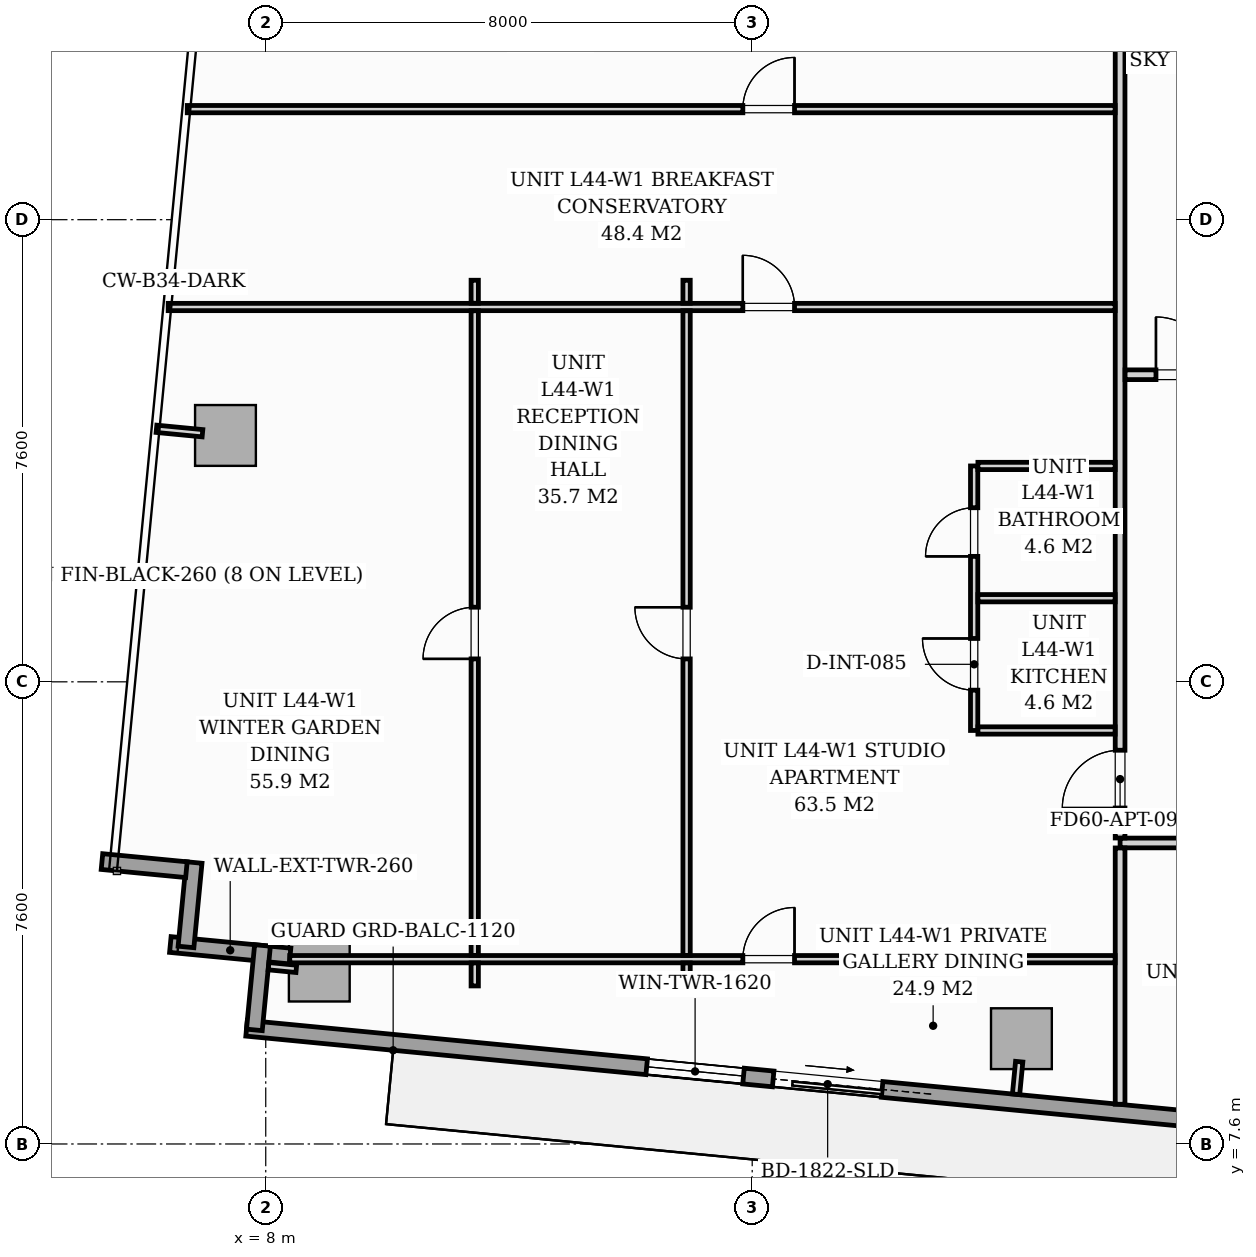
"""IFC4 building model, lengths in metres.
Left out: names, types, materials, properties, quantities, classifications, styles, units other than length and angle.
Written with IfcOpenShell. Run it as: python <this file> out.ifc"""

import sys

from ifc_helpers import new_model, si_unit, direction, frame, frame_2d, origin, origin_2d, place, context, subcontext, project, spatial, rectangle, extrude, source, transform, mapped, element, fill, save


model = new_model("IFC4")
c1 = context("Model", 3, precision=1e-05, world=origin(), true_north=direction((0.0, 1.0)))
c2 = subcontext(c1, "Body", "Model", "MODEL_VIEW")
j1 = project(units=[si_unit("LENGTHUNIT", "METRE"), si_unit("PLANEANGLEUNIT", "RADIAN")], contexts=[c1])
p1 = place(None, origin())
s1 = spatial("IfcSite", under=j1, at=p1, CompositionType="ELEMENT")
p2 = place(p1, origin())
s2 = spatial("IfcBuilding", under=s1, at=p2, CompositionType="ELEMENT")
p3 = place(p2, frame((0.0, 0.0, 153.4)))
s3 = spatial("IfcBuildingStorey", under=s2, at=p3, CompositionType="ELEMENT", Elevation=153.4)
m1 = source(origin(), c2, "Body", "SweptSolid", [
    extrude(rectangle(XDim=1.0, YDim=1.0, at=origin_2d()), origin(), (0.0, 0.0, 1.0), 3.196),
])
for number, where, z_axis, x_axis in (
    (1, (8.881, 10.443, 0.002), (0.0, 0.0, 1.0), (0.995, -0.096, 0.0)),
    (2, (20.427, 9.332, 0.002), (0.0, 0.0, 1.0), (0.995, -0.096, 0.0)),
    (3, (7.338, 19.252, 0.002), (0.0, 0.0, 1.0), (0.995, -0.096, 0.0)),
):
    element("IfcColumn", number, at=place(p3, frame(where, z_axis=z_axis, x_axis=x_axis)), inside=s3, PredefinedType="COLUMN", context=c2, shape_type="MappedRepresentation", body=[
        mapped(m1, transform((0.0, 0.0, 0.0), scale=1.0)),
    ])
p4 = place(p3, frame((8.4, 10.69, 0.0), z_axis=(0.0, 0.0, 1.0), x_axis=(-0.995391147587, 0.095898192396, 0.0)))
e4 = element("IfcWall", 4, at=p4, inside=s3, PredefinedType="STANDARD", context=c2, shape_type="SweptSolid", body=[
    extrude(rectangle(XDim=1.978, YDim=0.26, at=frame_2d((0.989, 0.0))), origin(), (0.0, 0.0, 1.0), 2.94),
])
p5 = place(p3, frame((6.688, 10.84, 0.0), z_axis=(0.0, 0.0, 1.0), x_axis=(0.09589913835, 0.995391056452, 0.0)))
e5 = element("IfcWall", 5, at=p5, inside=s3, PredefinedType="STANDARD", context=c2, shape_type="SweptSolid", body=[
    extrude(rectangle(XDim=1.395, YDim=0.26, at=frame_2d((0.698, 0.0))), origin(), (0.0, 0.0, 1.0), 2.94),
])
p6 = place(p3, frame((6.695, 12.111, 0.0), z_axis=(0.0, 0.0, 1.0), x_axis=(-0.99540614245, 0.095742423056, 0.0)))
e6 = element("IfcWall", 6, at=p6, inside=s3, PredefinedType="STANDARD", context=c2, shape_type="SweptSolid", body=[
    extrude(rectangle(XDim=1.395, YDim=0.26, at=frame_2d((0.697, 0.0))), origin(), (0.0, 0.0, 1.0), 2.94),
])
p7 = place(p3, frame((24.617, 7.873, 0.0), z_axis=(0.0, 0.0, 1.0), x_axis=(-0.995395976631, 0.095848055311, 0.0)))
e7 = element("IfcWall", 7, at=p7, inside=s3, PredefinedType="STANDARD", context=c2, shape_type="SweptSolid", body=[
    extrude(rectangle(XDim=17.01, YDim=0.26, at=frame_2d((8.505, 0.0))), origin(), (0.0, 0.0, 1.0), 2.94),
])
p8 = place(p7, frame((6.51, 0.0, 0.0)))
e8 = element("IfcOpeningElement", 8, at=p8, cuts=e7, PredefinedType="OPENING", context=c2, shape_type="SweptSolid", body=[
    extrude(rectangle(XDim=1.8, YDim=2.06, at=frame_2d((0.9, 1.03))), frame((0.0, 0.14, 0.0), z_axis=(0.0, -1.0, 0.0), x_axis=(1.0, 0.0, 0.0)), (0.0, 0.0, 1.0), 0.28),
])
p9 = place(p7, frame((8.8, 0.0, 0.65)))
e9 = element("IfcOpeningElement", 9, at=p9, cuts=e7, PredefinedType="OPENING", context=c2, shape_type="SweptSolid", body=[
    extrude(rectangle(XDim=1.6, YDim=1.5, at=frame_2d((0.8, 0.75))), frame((0.0, 0.14, 0.0), z_axis=(0.0, -1.0, 0.0), x_axis=(1.0, 0.0, 0.0)), (0.0, 0.0, 1.0), 0.28),
])
p10 = place(p3, frame((7.813, 9.476, 0.0), z_axis=(0.0, 0.0, 1.0), x_axis=(0.095915846097, 0.995389446633, 0.0)))
e10 = element("IfcWall", 10, at=p10, inside=s3, PredefinedType="STANDARD", context=c2, shape_type="SweptSolid", body=[
    extrude(rectangle(XDim=1.395, YDim=0.26, at=frame_2d((0.697, 0.0))), origin(), (0.0, 0.0, 1.0), 2.94),
])
p11 = place(p3, frame((22.05, 12.55, 0.0), z_axis=(0.0, 0.0, 1.0), x_axis=(1.0, 0.0, 0.0)))
e11 = element("IfcWall", 11, at=p11, inside=s3, PredefinedType="PARTITIONING", context=c2, shape_type="SweptSolid", body=[
    extrude(rectangle(XDim=23.83, YDim=0.16, at=frame_2d((11.915, 0.0))), origin(), (0.0, 0.0, 1.0), 2.94),
])
p12 = place(p11, frame((1.873, 0.0, 0.0)))
e12 = element("IfcOpeningElement", 12, at=p12, cuts=e11, PredefinedType="OPENING", context=c2, shape_type="SweptSolid", body=[
    extrude(rectangle(XDim=0.95, YDim=2.06, at=frame_2d((0.475, 1.03))), frame((0.0, 0.09, 0.0), z_axis=(0.0, -1.0, 0.0), x_axis=(1.0, 0.0, 0.0)), (0.0, 0.0, 1.0), 0.18),
])
p13 = place(p11, frame((10.224, 0.0, 0.0)))
e13 = element("IfcOpeningElement", 13, at=p13, cuts=e11, PredefinedType="OPENING", context=c2, shape_type="SweptSolid", body=[
    extrude(rectangle(XDim=0.95, YDim=2.06, at=frame_2d((0.475, 1.03))), frame((0.0, 0.09, 0.0), z_axis=(0.0, -1.0, 0.0), x_axis=(1.0, 0.0, 0.0)), (0.0, 0.0, 1.0), 0.18),
])
p14 = place(p11, frame((21.84, 0.0, 0.0)))
e14 = element("IfcOpeningElement", 14, at=p14, cuts=e11, PredefinedType="OPENING", context=c2, shape_type="SweptSolid", body=[
    extrude(rectangle(XDim=0.95, YDim=2.06, at=frame_2d((0.475, 1.03))), frame((0.0, 0.09, 0.0), z_axis=(0.0, -1.0, 0.0), x_axis=(1.0, 0.0, 0.0)), (0.0, 0.0, 1.0), 0.18),
])
p15 = place(p3, frame((22.05, 8.253, 0.0), z_axis=(0.0, 0.0, 1.0), x_axis=(0.0, 1.0, 0.0)))
e15 = element("IfcWall", 15, at=p15, inside=s3, PredefinedType="PARTITIONING", context=c2, shape_type="SweptSolid", body=[
    extrude(rectangle(XDim=4.215, YDim=0.16, at=frame_2d((2.107, 0.0))), origin(), (0.0, 0.0, 1.0), 2.94),
])
p16 = place(p3, frame((22.05, 12.632, 0.0), z_axis=(0.0, 0.0, 1.0), x_axis=(0.0, 1.0, 0.0)))
e16 = element("IfcWall", 16, at=p16, inside=s3, PredefinedType="PARTITIONING", context=c2, shape_type="SweptSolid", body=[
    extrude(rectangle(XDim=14.785, YDim=0.16, at=frame_2d((7.393, 0.0))), origin(), (0.0, 0.0, 1.0), 2.94),
])
p17 = place(p16, frame((0.493, 0.0, 0.0)))
e17 = element("IfcOpeningElement", 17, at=p17, cuts=e16, PredefinedType="OPENING", context=c2, shape_type="SweptSolid", body=[
    extrude(rectangle(XDim=0.95, YDim=2.06, at=frame_2d((0.475, 1.03))), frame((0.0, 0.09, 0.0), z_axis=(0.0, -1.0, 0.0), x_axis=(1.0, 0.0, 0.0)), (0.0, 0.0, 1.0), 0.18),
])
p18 = place(p3, frame((19.65, 14.4, 0.0), z_axis=(0.0, 0.0, 1.0), x_axis=(0.0, 1.0, 0.0)))
e18 = element("IfcWall", 18, at=p18, inside=s3, PredefinedType="PARTITIONING", context=c2, shape_type="SweptSolid", body=[
    extrude(rectangle(XDim=4.35, YDim=0.12, at=frame_2d((2.175, 0.0))), origin(), (0.0, 0.0, 1.0), 2.94),
])
p19 = place(p18, frame((0.663, 0.0, 0.0)))
e19 = element("IfcOpeningElement", 19, at=p19, cuts=e18, PredefinedType="OPENING", context=c2, shape_type="SweptSolid", body=[
    extrude(rectangle(XDim=0.85, YDim=2.05, at=frame_2d((0.425, 1.025))), frame((0.0, 0.07, 0.0), z_axis=(0.0, -1.0, 0.0), x_axis=(1.0, 0.0, 0.0)), (0.0, 0.0, 1.0), 0.14),
])
p20 = place(p18, frame((2.863, 0.0, 0.0)))
e20 = element("IfcOpeningElement", 20, at=p20, cuts=e18, PredefinedType="OPENING", context=c2, shape_type="SweptSolid", body=[
    extrude(rectangle(XDim=0.8, YDim=2.02, at=frame_2d((0.4, 1.01))), frame((0.0, 0.07, 0.0), z_axis=(0.0, -1.0, 0.0), x_axis=(1.0, 0.0, 0.0)), (0.0, 0.0, 1.0), 0.14),
])
for number, where, z_axis, x_axis in (
    (21, (19.712, 16.575, 0.0), (0.0, 0.0, 1.0), (1.0, 0.0, 0.0)),
    (22, (19.712, 14.4, 0.0), (0.0, 0.0, 1.0), (1.0, 0.0, 0.0)),
    (23, (19.712, 18.75, 0.0), (0.0, 0.0, 1.0), (1.0, 0.0, 0.0)),
):
    element("IfcWall", number, at=place(p3, frame(where, z_axis=z_axis, x_axis=x_axis)), inside=s3, PredefinedType="PARTITIONING", context=c2, shape_type="SweptSolid", body=[
        extrude(rectangle(XDim=2.256, YDim=0.12, at=frame_2d((1.128, 0.0))), origin(), (0.0, 0.0, 1.0), 2.94),
    ])
p21 = place(p3, frame((6.709, 24.618, 0.0), z_axis=(0.0, 0.0, 1.0), x_axis=(1.0, 0.0, 0.0)))
e24 = element("IfcWall", 24, at=p21, inside=s3, PredefinedType="PARTITIONING", context=c2, shape_type="SweptSolid", body=[
    extrude(rectangle(XDim=15.259, YDim=0.12, at=frame_2d((7.629, 0.0))), origin(), (0.0, 0.0, 1.0), 2.94),
])
p22 = place(p21, frame((9.137, 0.0, 0.0)))
e25 = element("IfcOpeningElement", 25, at=p22, cuts=e24, PredefinedType="OPENING", context=c2, shape_type="SweptSolid", body=[
    extrude(rectangle(XDim=0.85, YDim=2.05, at=frame_2d((0.425, 1.025))), frame((0.0, 0.07, 0.0), z_axis=(0.0, -1.0, 0.0), x_axis=(1.0, 0.0, 0.0)), (0.0, 0.0, 1.0), 0.14),
])
p23 = place(p3, frame((6.396, 21.364, 0.0), z_axis=(0.0, 0.0, 1.0), x_axis=(1.0, 0.0, 0.0)))
e26 = element("IfcWall", 26, at=p23, inside=s3, PredefinedType="PARTITIONING", context=c2, shape_type="SweptSolid", body=[
    extrude(rectangle(XDim=15.572, YDim=0.12, at=frame_2d((7.786, 0.0))), origin(), (0.0, 0.0, 1.0), 2.94),
])
p24 = place(p23, frame((9.45, 0.0, 0.0)))
e27 = element("IfcOpeningElement", 27, at=p24, cuts=e26, PredefinedType="OPENING", context=c2, shape_type="SweptSolid", body=[
    extrude(rectangle(XDim=0.85, YDim=2.05, at=frame_2d((0.425, 1.025))), frame((0.0, 0.07, 0.0), z_axis=(0.0, -1.0, 0.0), x_axis=(1.0, 0.0, 0.0)), (0.0, 0.0, 1.0), 0.14),
])
p25 = place(p3, frame((8.395, 10.639, 0.0), z_axis=(0.0, 0.0, 1.0), x_axis=(1.0, 0.0, 0.0)))
e28 = element("IfcWall", 28, at=p25, inside=s3, PredefinedType="PARTITIONING", context=c2, shape_type="SweptSolid", body=[
    extrude(rectangle(XDim=13.573, YDim=0.12, at=frame_2d((6.787, 0.0))), origin(), (0.0, 0.0, 1.0), 2.94),
])
p26 = place(p25, frame((7.451, 0.0, 0.0)))
e29 = element("IfcOpeningElement", 29, at=p26, cuts=e28, PredefinedType="OPENING", context=c2, shape_type="SweptSolid", body=[
    extrude(rectangle(XDim=0.85, YDim=2.05, at=frame_2d((0.425, 1.025))), frame((0.0, 0.07, 0.0), z_axis=(0.0, -1.0, 0.0), x_axis=(1.0, 0.0, 0.0)), (0.0, 0.0, 1.0), 0.14),
])
p27 = place(p3, frame((11.437, 10.199, 0.0), z_axis=(0.0, 0.0, 1.0), x_axis=(0.0, 1.0, 0.0)))
e30 = element("IfcWall", 30, at=p27, inside=s3, PredefinedType="PARTITIONING", context=c2, shape_type="SweptSolid", body=[
    extrude(rectangle(XDim=0.378, YDim=0.12, at=frame_2d((0.189, 0.0))), origin(), (0.0, 0.0, 1.0), 2.94),
])
p28 = place(p3, frame((11.437, 10.701, 0.0), z_axis=(0.0, 0.0, 1.0), x_axis=(0.0, 1.0, 0.0)))
e31 = element("IfcWall", 31, at=p28, inside=s3, PredefinedType="PARTITIONING", context=c2, shape_type="SweptSolid", body=[
    extrude(rectangle(XDim=10.601, YDim=0.12, at=frame_2d((5.301, 0.0))), origin(), (0.0, 0.0, 1.0), 2.94),
])
p29 = place(p28, frame((4.876, 0.0, 0.0)))
e32 = element("IfcOpeningElement", 32, at=p29, cuts=e31, PredefinedType="OPENING", context=c2, shape_type="SweptSolid", body=[
    extrude(rectangle(XDim=0.85, YDim=2.05, at=frame_2d((0.425, 1.025))), frame((0.0, 0.07, 0.0), z_axis=(0.0, -1.0, 0.0), x_axis=(1.0, 0.0, 0.0)), (0.0, 0.0, 1.0), 0.14),
])
for number, where, z_axis, x_axis in (
    (33, (11.437, 21.426, 0.0), (0.0, 0.0, 1.0), (0.0, 1.0, 0.0)),
    (34, (14.921, 10.199, 0.0), (0.0, 0.0, 1.0), (0.0, 1.0, 0.0)),
):
    element("IfcWall", number, at=place(p3, frame(where, z_axis=z_axis, x_axis=x_axis)), inside=s3, PredefinedType="PARTITIONING", context=c2, shape_type="SweptSolid", body=[
        extrude(rectangle(XDim=0.378, YDim=0.12, at=frame_2d((0.189, 0.0))), origin(), (0.0, 0.0, 1.0), 2.94),
    ])
p30 = place(p3, frame((14.921, 10.701, 0.0), z_axis=(0.0, 0.0, 1.0), x_axis=(0.0, 1.0, 0.0)))
e35 = element("IfcWall", 35, at=p30, inside=s3, PredefinedType="PARTITIONING", context=c2, shape_type="SweptSolid", body=[
    extrude(rectangle(XDim=10.601, YDim=0.12, at=frame_2d((5.301, 0.0))), origin(), (0.0, 0.0, 1.0), 2.94),
])
p31 = place(p30, frame((4.876, 0.0, 0.0)))
e36 = element("IfcOpeningElement", 36, at=p31, cuts=e35, PredefinedType="OPENING", context=c2, shape_type="SweptSolid", body=[
    extrude(rectangle(XDim=0.85, YDim=2.05, at=frame_2d((0.425, 1.025))), frame((0.0, 0.07, 0.0), z_axis=(0.0, -1.0, 0.0), x_axis=(1.0, 0.0, 0.0)), (0.0, 0.0, 1.0), 0.14),
])
p32 = place(p3, frame((14.921, 21.426, 0.0), z_axis=(0.0, 0.0, 1.0), x_axis=(0.0, 1.0, 0.0)))
e37 = element("IfcWall", 37, at=p32, inside=s3, PredefinedType="PARTITIONING", context=c2, shape_type="SweptSolid", body=[
    extrude(rectangle(XDim=0.378, YDim=0.12, at=frame_2d((0.189, 0.0))), origin(), (0.0, 0.0, 1.0), 2.94),
])
p33 = place(p3, frame((22.132, 20.25, 0.0), z_axis=(0.0, 0.0, 1.0), x_axis=(1.0, 0.0, 0.0)))
e38 = element("IfcWall", 38, at=p33, inside=s3, PredefinedType="PARTITIONING", context=c2, shape_type="SweptSolid", body=[
    extrude(rectangle(XDim=1.886, YDim=0.16, at=frame_2d((0.943, 0.0))), origin(), (0.0, 0.0, 1.0), 2.94),
])
p34 = place(p33, frame((0.508, 0.0, 0.0)))
e39 = element("IfcOpeningElement", 39, at=p34, cuts=e38, PredefinedType="OPENING", context=c2, shape_type="SweptSolid", body=[
    extrude(rectangle(XDim=0.95, YDim=2.06, at=frame_2d((0.475, 1.03))), frame((0.0, 0.09, 0.0), z_axis=(0.0, -1.0, 0.0), x_axis=(1.0, 0.0, 0.0)), (0.0, 0.0, 1.0), 0.18),
])
p35 = place(p3, frame((8.502, 10.48, 0.0), z_axis=(0.0, 0.0, 1.0), x_axis=(-0.995384576284, 0.09596637586, 0.0)))
e40 = element("IfcWall", 40, at=p35, inside=s3, PredefinedType="PARTITIONING", context=c2, shape_type="SweptSolid", body=[
    extrude(rectangle(XDim=0.458, YDim=0.12, at=frame_2d((0.229, 0.0))), origin(), (0.0, 0.0, 1.0), 2.94),
])
p36 = place(p3, frame((20.391, 8.953, 0.0), z_axis=(0.0, 0.0, 1.0), x_axis=(-0.096222656154, -0.995359834654, 0.0)))
e41 = element("IfcWall", 41, at=p36, inside=s3, PredefinedType="PARTITIONING", context=c2, shape_type="SweptSolid", body=[
    extrude(rectangle(XDim=0.538, YDim=0.12, at=frame_2d((0.269, 0.0))), origin(), (0.0, 0.0, 1.0), 2.94),
])
p37 = place(p3, frame((6.959, 19.288, 0.0), z_axis=(0.0, 0.0, 1.0), x_axis=(-0.995377786728, 0.096036772582, 0.0)))
e42 = element("IfcWall", 42, at=p37, inside=s3, PredefinedType="PARTITIONING", context=c2, shape_type="SweptSolid", body=[
    extrude(rectangle(XDim=0.76, YDim=0.12, at=frame_2d((0.38, 0.0))), origin(), (0.0, 0.0, 1.0), 2.94),
])
m2 = source(origin(), c2, "Body", "SweptSolid", [
    extrude(rectangle(XDim=1.8, YDim=2.06, at=frame_2d((0.9, 1.03))), frame((0.0, 0.025, 0.0), z_axis=(0.0, -1.0, 0.0), x_axis=(1.0, 0.0, 0.0)), (0.0, 0.0, 1.0), 0.05),
])
p38 = place(p8, origin())
e43 = element("IfcDoor", 43, at=p38, inside=s3, OperationType="SLIDING_TO_LEFT", PredefinedType="DOOR", context=c2, shape_type="MappedRepresentation", body=[
    mapped(m2, transform((0.0, 0.0, 0.0), scale=1.0)),
])
fill(e8, e43)
m3 = source(origin(), c2, "Body", "SweptSolid", [
    extrude(rectangle(XDim=1.6, YDim=1.5, at=frame_2d((0.8, 0.75))), frame((0.0, 0.03, 0.0), z_axis=(0.0, -1.0, 0.0), x_axis=(1.0, 0.0, 0.0)), (0.0, 0.0, 1.0), 0.06),
])
p39 = place(p9, origin())
e44 = element("IfcWindow", 44, at=p39, inside=s3, PartitioningType="SINGLE_PANEL", PredefinedType="WINDOW", context=c2, shape_type="MappedRepresentation", body=[
    mapped(m3, transform((0.0, 0.0, 0.0), scale=1.0)),
])
fill(e9, e44)
m4 = source(origin(), c2, "Body", "SweptSolid", [
    extrude(rectangle(XDim=0.95, YDim=2.06, at=frame_2d((0.475, 1.03))), frame((0.0, 0.025, 0.0), z_axis=(0.0, -1.0, 0.0), x_axis=(1.0, 0.0, 0.0)), (0.0, 0.0, 1.0), 0.05),
])
p40 = place(p17, origin())
e45 = element("IfcDoor", 45, at=p40, inside=s3, OperationType="SINGLE_SWING_LEFT", PredefinedType="DOOR", context=c2, shape_type="MappedRepresentation", body=[
    mapped(m4, transform((0.0, 0.0, 0.0), scale=1.0)),
])
fill(e17, e45)
m5 = source(origin(), c2, "Body", "SweptSolid", [
    extrude(rectangle(XDim=0.85, YDim=2.05, at=frame_2d((0.425, 1.025))), frame((0.0, 0.025, 0.0), z_axis=(0.0, -1.0, 0.0), x_axis=(1.0, 0.0, 0.0)), (0.0, 0.0, 1.0), 0.05),
])
p41 = place(p19, origin())
e46 = element("IfcDoor", 46, at=p41, inside=s3, OperationType="SINGLE_SWING_RIGHT", PredefinedType="DOOR", context=c2, shape_type="MappedRepresentation", body=[
    mapped(m5, transform((0.0, 0.0, 0.0), scale=1.0)),
])
fill(e19, e46)
m6 = source(origin(), c2, "Body", "SweptSolid", [
    extrude(rectangle(XDim=0.8, YDim=2.02, at=frame_2d((0.4, 1.01))), frame((0.0, 0.025, 0.0), z_axis=(0.0, -1.0, 0.0), x_axis=(1.0, 0.0, 0.0)), (0.0, 0.0, 1.0), 0.05),
])
p42 = place(p20, origin())
e47 = element("IfcDoor", 47, at=p42, inside=s3, OperationType="SINGLE_SWING_LEFT", PredefinedType="DOOR", context=c2, shape_type="MappedRepresentation", body=[
    mapped(m6, transform((0.0, 0.0, 0.0), scale=1.0)),
])
fill(e20, e47)
p43 = place(p22, origin())
e48 = element("IfcDoor", 48, at=p43, inside=s3, OperationType="SINGLE_SWING_RIGHT", PredefinedType="DOOR", context=c2, shape_type="MappedRepresentation", body=[
    mapped(m5, transform((0.0, 0.0, 0.0), scale=1.0)),
])
fill(e25, e48)
p44 = place(p24, origin())
e49 = element("IfcDoor", 49, at=p44, inside=s3, OperationType="SINGLE_SWING_LEFT", PredefinedType="DOOR", context=c2, shape_type="MappedRepresentation", body=[
    mapped(m5, transform((0.0, 0.0, 0.0), scale=1.0)),
])
fill(e27, e49)
p45 = place(p26, origin())
e50 = element("IfcDoor", 50, at=p45, inside=s3, OperationType="SINGLE_SWING_RIGHT", PredefinedType="DOOR", context=c2, shape_type="MappedRepresentation", body=[
    mapped(m5, transform((0.0, 0.0, 0.0), scale=1.0)),
])
fill(e29, e50)
p46 = place(p29, origin())
e51 = element("IfcDoor", 51, at=p46, inside=s3, OperationType="SINGLE_SWING_LEFT", PredefinedType="DOOR", context=c2, shape_type="MappedRepresentation", body=[
    mapped(m5, transform((0.0, 0.0, 0.0), scale=1.0)),
])
fill(e32, e51)
p47 = place(p31, origin())
e52 = element("IfcDoor", 52, at=p47, inside=s3, OperationType="SINGLE_SWING_RIGHT", PredefinedType="DOOR", context=c2, shape_type="MappedRepresentation", body=[
    mapped(m5, transform((0.0, 0.0, 0.0), scale=1.0)),
])
fill(e36, e52)
p48 = place(p34, origin())
e53 = element("IfcDoor", 53, at=p48, inside=s3, OperationType="SINGLE_SWING_LEFT", PredefinedType="DOOR", context=c2, shape_type="MappedRepresentation", body=[
    mapped(m4, transform((0.0, 0.0, 0.0), scale=1.0)),
])
fill(e39, e53)
save(model, sys.argv[1])
